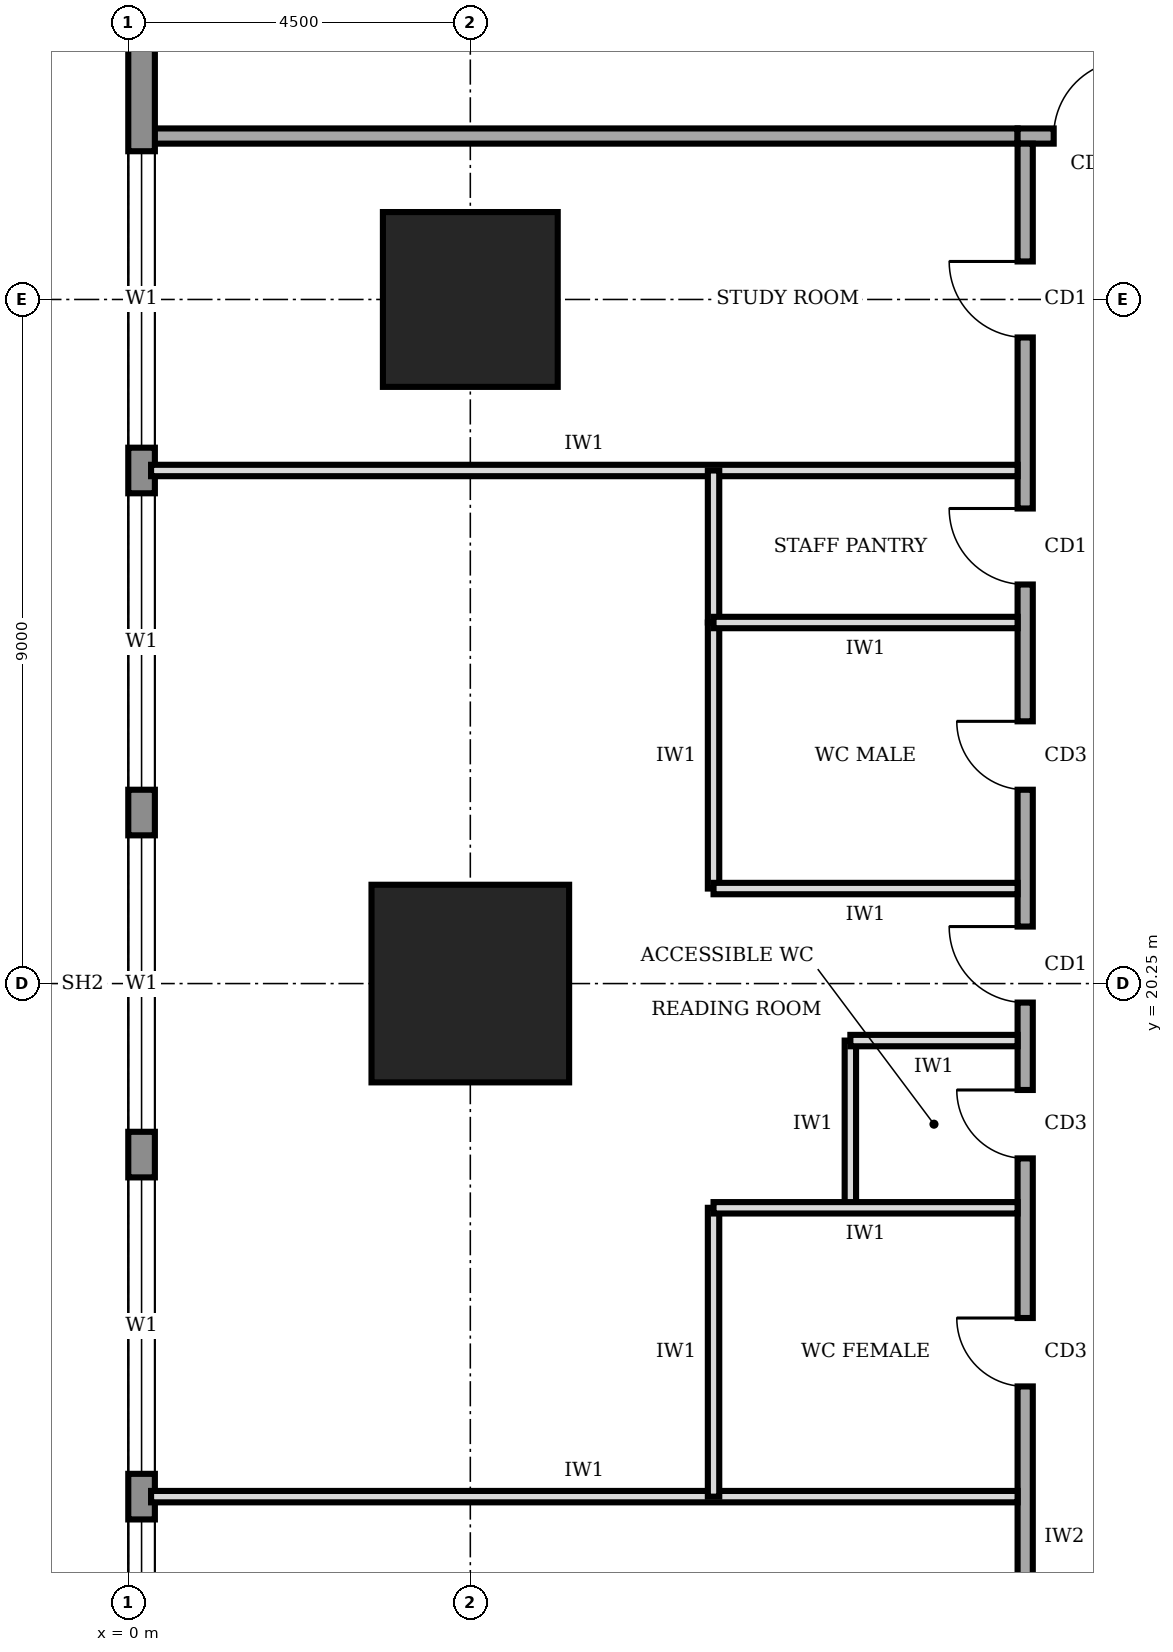
"""IFC4 building model, lengths in metres.
Left out: names, types, materials, properties, quantities, classifications, styles, units other than length and angle.
Written with IfcOpenShell. Run it as: python <this file> out.ifc"""

import sys

from ifc_helpers import new_model, si_unit, direction, frame, frame_2d, origin, origin_2d, place, context, subcontext, project, spatial, rectangle, extrude, element, fill, save


model = new_model("IFC4")
c1 = context("Model", 3, precision=1e-05, world=origin(), true_north=direction((0.0, 1.0)))
c2 = subcontext(c1, "Body", "Model", "MODEL_VIEW")
j1 = project(units=[si_unit("LENGTHUNIT", "METRE"), si_unit("PLANEANGLEUNIT", "RADIAN")], contexts=[c1])
p1 = place(None, origin())
s1 = spatial("IfcSite", under=j1, at=p1, CompositionType="ELEMENT")
p2 = place(p1, origin())
s2 = spatial("IfcBuilding", under=s1, at=p2, CompositionType="ELEMENT")
p3 = place(p2, frame((0.0, 0.0, 133.0)))
s3 = spatial("IfcBuildingStorey", under=s2, at=p3, CompositionType="ELEMENT", Elevation=133.0)
p4 = place(p3, frame((4.5, 20.25, 0.0), z_axis=(0.0, 0.0, 1.0), x_axis=(1.0, 0.0, 0.0)))
e1 = element("IfcColumn", 1, at=p4, inside=s3, PredefinedType="COLUMN", context=c2, shape_type="SweptSolid", body=[
    extrude(rectangle(XDim=2.6, YDim=2.6, at=origin_2d()), origin(), (0.0, 0.0, 1.0), 4.0),
])
p5 = place(p3, frame((4.5, 29.25, 0.0), z_axis=(0.0, 0.0, 1.0), x_axis=(1.0, 0.0, 0.0)))
e2 = element("IfcColumn", 2, at=p5, inside=s3, PredefinedType="COLUMN", context=c2, shape_type="SweptSolid", body=[
    extrude(rectangle(XDim=2.3, YDim=2.3, at=origin_2d()), origin(), (0.0, 0.0, 1.0), 4.0),
])
p6 = place(p3, frame((0.175, 35.98, 0.0), z_axis=(0.0, 0.0, 1.0), x_axis=(0.0, -1.0, 0.0)))
e3 = element("IfcWall", 3, at=p6, inside=s3, PredefinedType="STANDARD", context=c2, shape_type="SweptSolid", body=[
    extrude(rectangle(XDim=31.46, YDim=0.35, at=frame_2d((15.73, 0.0))), origin(), (0.0, 0.0, 1.0), 3.75),
])
p7 = place(p6, frame((27.21, 0.0, 0.9)))
e4 = element("IfcOpeningElement", 4, at=p7, cuts=e3, PredefinedType="OPENING", context=c2, shape_type="SweptSolid", body=[
    extrude(rectangle(XDim=3.9, YDim=2.2, at=frame_2d((1.95, 1.1))), frame((0.0, 0.185, 0.0), z_axis=(0.0, -1.0, 0.0), x_axis=(1.0, 0.0, 0.0)), (0.0, 0.0, 1.0), 0.37),
])
p8 = place(p6, frame((22.78, 0.0, 0.9)))
e5 = element("IfcOpeningElement", 5, at=p8, cuts=e3, PredefinedType="OPENING", context=c2, shape_type="SweptSolid", body=[
    extrude(rectangle(XDim=3.9, YDim=2.2, at=frame_2d((1.95, 1.1))), frame((0.0, 0.185, 0.0), z_axis=(0.0, -1.0, 0.0), x_axis=(1.0, 0.0, 0.0)), (0.0, 0.0, 1.0), 0.37),
])
p9 = place(p6, frame((18.28, 0.0, 0.9)))
e6 = element("IfcOpeningElement", 6, at=p9, cuts=e3, PredefinedType="OPENING", context=c2, shape_type="SweptSolid", body=[
    extrude(rectangle(XDim=3.9, YDim=2.2, at=frame_2d((1.95, 1.1))), frame((0.0, 0.185, 0.0), z_axis=(0.0, -1.0, 0.0), x_axis=(1.0, 0.0, 0.0)), (0.0, 0.0, 1.0), 0.37),
])
p10 = place(p6, frame((13.78, 0.0, 0.9)))
e7 = element("IfcOpeningElement", 7, at=p10, cuts=e3, PredefinedType="OPENING", context=c2, shape_type="SweptSolid", body=[
    extrude(rectangle(XDim=3.9, YDim=2.2, at=frame_2d((1.95, 1.1))), frame((0.0, 0.185, 0.0), z_axis=(0.0, -1.0, 0.0), x_axis=(1.0, 0.0, 0.0)), (0.0, 0.0, 1.0), 0.37),
])
p11 = place(p6, frame((9.28, 0.0, 0.9)))
e8 = element("IfcOpeningElement", 8, at=p11, cuts=e3, PredefinedType="OPENING", context=c2, shape_type="SweptSolid", body=[
    extrude(rectangle(XDim=3.9, YDim=2.2, at=frame_2d((1.95, 1.1))), frame((0.0, 0.185, 0.0), z_axis=(0.0, -1.0, 0.0), x_axis=(1.0, 0.0, 0.0)), (0.0, 0.0, 1.0), 0.37),
])
p12 = place(p6, frame((4.78, 0.0, 0.9)))
e9 = element("IfcOpeningElement", 9, at=p12, cuts=e3, PredefinedType="OPENING", context=c2, shape_type="SweptSolid", body=[
    extrude(rectangle(XDim=3.9, YDim=2.2, at=frame_2d((1.95, 1.1))), frame((0.0, 0.185, 0.0), z_axis=(0.0, -1.0, 0.0), x_axis=(1.0, 0.0, 0.0)), (0.0, 0.0, 1.0), 0.37),
])
p13 = place(p3, frame((28.6, 31.4, 0.0), z_axis=(0.0, 0.0, 1.0), x_axis=(-1.0, 0.0, 0.0)))
e10 = element("IfcWall", 10, at=p13, inside=s3, PredefinedType="SOLIDWALL", context=c2, shape_type="SweptSolid", body=[
    extrude(rectangle(XDim=16.9, YDim=0.2, at=frame_2d((8.45, 0.0))), origin(), (0.0, 0.0, 1.0), 3.75),
])
p14 = place(p13, frame((15.425, 0.0, 0.0)))
e11 = element("IfcOpeningElement", 11, at=p14, cuts=e10, PredefinedType="OPENING", context=c2, shape_type="SweptSolid", body=[
    extrude(rectangle(XDim=1.0, YDim=2.1, at=frame_2d((0.5, 1.05))), frame((0.0, 0.11, 0.0), z_axis=(0.0, -1.0, 0.0), x_axis=(1.0, 0.0, 0.0)), (0.0, 0.0, 1.0), 0.22),
])
p15 = place(p13, frame((12.35, 0.0, 0.0)))
e12 = element("IfcOpeningElement", 12, at=p15, cuts=e10, PredefinedType="OPENING", context=c2, shape_type="SweptSolid", body=[
    extrude(rectangle(XDim=1.0, YDim=2.1, at=frame_2d((0.5, 1.05))), frame((0.0, 0.11, 0.0), z_axis=(0.0, -1.0, 0.0), x_axis=(1.0, 0.0, 0.0)), (0.0, 0.0, 1.0), 0.22),
])
p16 = place(p13, frame((5.6, 0.0, 0.0)))
e13 = element("IfcOpeningElement", 13, at=p16, cuts=e10, PredefinedType="OPENING", context=c2, shape_type="SweptSolid", body=[
    extrude(rectangle(XDim=1.0, YDim=2.1, at=frame_2d((0.5, 1.05))), frame((0.0, 0.11, 0.0), z_axis=(0.0, -1.0, 0.0), x_axis=(1.0, 0.0, 0.0)), (0.0, 0.0, 1.0), 0.22),
])
p17 = place(p13, frame((0.275, 0.0, 0.0)))
e14 = element("IfcOpeningElement", 14, at=p17, cuts=e10, PredefinedType="OPENING", context=c2, shape_type="SweptSolid", body=[
    extrude(rectangle(XDim=1.0, YDim=2.1, at=frame_2d((0.5, 1.05))), frame((0.0, 0.11, 0.0), z_axis=(0.0, -1.0, 0.0), x_axis=(1.0, 0.0, 0.0)), (0.0, 0.0, 1.0), 0.22),
])
p18 = place(p3, frame((11.8, 31.3, 0.0), z_axis=(0.0, 0.0, 1.0), x_axis=(0.0, -1.0, 0.0)))
e15 = element("IfcWall", 15, at=p18, inside=s3, PredefinedType="SOLIDWALL", context=c2, shape_type="SweptSolid", body=[
    extrude(rectangle(XDim=23.8, YDim=0.2, at=frame_2d((11.9, 0.0))), origin(), (0.0, 0.0, 1.0), 3.75),
])
p19 = place(p18, frame((20.3, 0.0, 0.0)))
e16 = element("IfcOpeningElement", 16, at=p19, cuts=e15, PredefinedType="OPENING", context=c2, shape_type="SweptSolid", body=[
    extrude(rectangle(XDim=1.0, YDim=2.1, at=frame_2d((0.5, 1.05))), frame((0.0, 0.11, 0.0), z_axis=(0.0, -1.0, 0.0), x_axis=(1.0, 0.0, 0.0)), (0.0, 0.0, 1.0), 0.22),
])
p20 = place(p18, frame((15.45, 0.0, 0.0)))
e17 = element("IfcOpeningElement", 17, at=p20, cuts=e15, PredefinedType="OPENING", context=c2, shape_type="SweptSolid", body=[
    extrude(rectangle(XDim=0.9, YDim=2.1, at=frame_2d((0.45, 1.05))), frame((0.0, 0.11, 0.0), z_axis=(0.0, -1.0, 0.0), x_axis=(1.0, 0.0, 0.0)), (0.0, 0.0, 1.0), 0.22),
])
p21 = place(p18, frame((12.45, 0.0, 0.0)))
e18 = element("IfcOpeningElement", 18, at=p21, cuts=e15, PredefinedType="OPENING", context=c2, shape_type="SweptSolid", body=[
    extrude(rectangle(XDim=0.9, YDim=2.1, at=frame_2d((0.45, 1.05))), frame((0.0, 0.11, 0.0), z_axis=(0.0, -1.0, 0.0), x_axis=(1.0, 0.0, 0.0)), (0.0, 0.0, 1.0), 0.22),
])
p22 = place(p18, frame((7.6, 0.0, 0.0)))
e19 = element("IfcOpeningElement", 19, at=p22, cuts=e15, PredefinedType="OPENING", context=c2, shape_type="SweptSolid", body=[
    extrude(rectangle(XDim=0.9, YDim=2.1, at=frame_2d((0.45, 1.05))), frame((0.0, 0.11, 0.0), z_axis=(0.0, -1.0, 0.0), x_axis=(1.0, 0.0, 0.0)), (0.0, 0.0, 1.0), 0.22),
])
p23 = place(p18, frame((4.8, 0.0, 0.0)))
e20 = element("IfcOpeningElement", 20, at=p23, cuts=e15, PredefinedType="OPENING", context=c2, shape_type="SweptSolid", body=[
    extrude(rectangle(XDim=1.0, YDim=2.1, at=frame_2d((0.5, 1.05))), frame((0.0, 0.11, 0.0), z_axis=(0.0, -1.0, 0.0), x_axis=(1.0, 0.0, 0.0)), (0.0, 0.0, 1.0), 0.22),
])
p24 = place(p18, frame((10.3, 0.0, 0.0)))
e21 = element("IfcOpeningElement", 21, at=p24, cuts=e15, PredefinedType="OPENING", context=c2, shape_type="SweptSolid", body=[
    extrude(rectangle(XDim=1.0, YDim=2.1, at=frame_2d((0.5, 1.05))), frame((0.0, 0.11, 0.0), z_axis=(0.0, -1.0, 0.0), x_axis=(1.0, 0.0, 0.0)), (0.0, 0.0, 1.0), 0.22),
])
p25 = place(p18, frame((1.55, 0.0, 0.0)))
e22 = element("IfcOpeningElement", 22, at=p25, cuts=e15, PredefinedType="OPENING", context=c2, shape_type="SweptSolid", body=[
    extrude(rectangle(XDim=1.0, YDim=2.1, at=frame_2d((0.5, 1.05))), frame((0.0, 0.11, 0.0), z_axis=(0.0, -1.0, 0.0), x_axis=(1.0, 0.0, 0.0)), (0.0, 0.0, 1.0), 0.22),
])
p26 = place(p3, frame((0.3, 31.4, 0.0), z_axis=(0.0, 0.0, 1.0), x_axis=(1.0, 0.0, 0.0)))
e23 = element("IfcWall", 23, at=p26, inside=s3, PredefinedType="SOLIDWALL", context=c2, shape_type="SweptSolid", body=[
    extrude(rectangle(XDim=11.4, YDim=0.2, at=frame_2d((5.7, 0.0))), origin(), (0.0, 0.0, 1.0), 3.75),
])
for number, where, z_axis, x_axis in (
    (24, (0.3, 13.5, 0.0), (0.0, 0.0, 1.0), (1.0, 0.0, 0.0)),
    (25, (0.3, 27.0, 0.0), (0.0, 0.0, 1.0), (1.0, 0.0, 0.0)),
):
    element("IfcWall", number, at=place(p3, frame(where, z_axis=z_axis, x_axis=x_axis)), inside=s3, PredefinedType="PARTITIONING", context=c2, shape_type="SweptSolid", body=[
        extrude(rectangle(XDim=11.4, YDim=0.15, at=frame_2d((5.7, 0.0))), origin(), (0.0, 0.0, 1.0), 3.75),
    ])
p27 = place(p3, frame((11.7, 17.3, 0.0), z_axis=(0.0, 0.0, 1.0), x_axis=(-1.0, 0.0, 0.0)))
e26 = element("IfcWall", 26, at=p27, inside=s3, PredefinedType="PARTITIONING", context=c2, shape_type="SweptSolid", body=[
    extrude(rectangle(XDim=4.0, YDim=0.15, at=frame_2d((2.0, 0.0))), origin(), (0.0, 0.0, 1.0), 3.75),
])
p28 = place(p3, frame((11.7, 19.5, 0.0), z_axis=(0.0, 0.0, 1.0), x_axis=(-1.0, 0.0, 0.0)))
e27 = element("IfcWall", 27, at=p28, inside=s3, PredefinedType="PARTITIONING", context=c2, shape_type="SweptSolid", body=[
    extrude(rectangle(XDim=2.2, YDim=0.15, at=frame_2d((1.1, 0.0))), origin(), (0.0, 0.0, 1.0), 2.85),
])
for number, where, z_axis, x_axis in (
    (28, (11.7, 21.5, 0.0), (0.0, 0.0, 1.0), (-1.0, 0.0, 0.0)),
    (29, (11.7, 25.0, 0.0), (0.0, 0.0, 1.0), (-1.0, 0.0, 0.0)),
):
    element("IfcWall", number, at=place(p3, frame(where, z_axis=z_axis, x_axis=x_axis)), inside=s3, PredefinedType="PARTITIONING", context=c2, shape_type="SweptSolid", body=[
        extrude(rectangle(XDim=4.0, YDim=0.15, at=frame_2d((2.0, 0.0))), origin(), (0.0, 0.0, 1.0), 3.75),
    ])
p29 = place(p3, frame((7.7, 13.5, 0.0), z_axis=(0.0, 0.0, 1.0), x_axis=(0.0, 1.0, 0.0)))
e30 = element("IfcWall", 30, at=p29, inside=s3, PredefinedType="PARTITIONING", context=c2, shape_type="SweptSolid", body=[
    extrude(rectangle(XDim=3.8, YDim=0.15, at=frame_2d((1.9, 0.0))), origin(), (0.0, 0.0, 1.0), 3.75),
])
p30 = place(p3, frame((9.5, 17.3, 0.0), z_axis=(0.0, 0.0, 1.0), x_axis=(0.0, 1.0, 0.0)))
e31 = element("IfcWall", 31, at=p30, inside=s3, PredefinedType="PARTITIONING", context=c2, shape_type="SweptSolid", body=[
    extrude(rectangle(XDim=2.2, YDim=0.15, at=frame_2d((1.1, 0.0))), origin(), (0.0, 0.0, 1.0), 3.75),
])
p31 = place(p3, frame((7.7, 21.5, 0.0), z_axis=(0.0, 0.0, 1.0), x_axis=(0.0, 1.0, 0.0)))
e32 = element("IfcWall", 32, at=p31, inside=s3, PredefinedType="PARTITIONING", context=c2, shape_type="SweptSolid", body=[
    extrude(rectangle(XDim=3.5, YDim=0.15, at=frame_2d((1.75, 0.0))), origin(), (0.0, 0.0, 1.0), 3.75),
])
p32 = place(p3, frame((7.7, 25.0, 0.0), z_axis=(0.0, 0.0, 1.0), x_axis=(0.0, 1.0, 0.0)))
e33 = element("IfcWall", 33, at=p32, inside=s3, PredefinedType="PARTITIONING", context=c2, shape_type="SweptSolid", body=[
    extrude(rectangle(XDim=2.0, YDim=0.15, at=frame_2d((1.0, 0.0))), origin(), (0.0, 0.0, 1.0), 3.75),
])
p33 = place(p8, origin())
e34 = element("IfcWindow", 34, at=p33, inside=s3, PartitioningType="SINGLE_PANEL", PredefinedType="WINDOW", context=c2, shape_type="SweptSolid", body=[
    extrude(rectangle(XDim=3.9, YDim=2.2, at=frame_2d((1.95, 1.1))), frame((0.0, 0.03, 0.0), z_axis=(0.0, -1.0, 0.0), x_axis=(1.0, 0.0, 0.0)), (0.0, 0.0, 1.0), 0.06),
])
fill(e5, e34)
p34 = place(p9, origin())
e35 = element("IfcWindow", 35, at=p34, inside=s3, PartitioningType="SINGLE_PANEL", PredefinedType="WINDOW", context=c2, shape_type="SweptSolid", body=[
    extrude(rectangle(XDim=3.9, YDim=2.2, at=frame_2d((1.95, 1.1))), frame((0.0, 0.03, 0.0), z_axis=(0.0, -1.0, 0.0), x_axis=(1.0, 0.0, 0.0)), (0.0, 0.0, 1.0), 0.06),
])
fill(e6, e35)
p35 = place(p10, origin())
e36 = element("IfcWindow", 36, at=p35, inside=s3, PartitioningType="SINGLE_PANEL", PredefinedType="WINDOW", context=c2, shape_type="SweptSolid", body=[
    extrude(rectangle(XDim=3.9, YDim=2.2, at=frame_2d((1.95, 1.1))), frame((0.0, 0.03, 0.0), z_axis=(0.0, -1.0, 0.0), x_axis=(1.0, 0.0, 0.0)), (0.0, 0.0, 1.0), 0.06),
])
fill(e7, e36)
p36 = place(p11, origin())
e37 = element("IfcWindow", 37, at=p36, inside=s3, PartitioningType="SINGLE_PANEL", PredefinedType="WINDOW", context=c2, shape_type="SweptSolid", body=[
    extrude(rectangle(XDim=3.9, YDim=2.2, at=frame_2d((1.95, 1.1))), frame((0.0, 0.03, 0.0), z_axis=(0.0, -1.0, 0.0), x_axis=(1.0, 0.0, 0.0)), (0.0, 0.0, 1.0), 0.06),
])
fill(e8, e37)
p37 = place(p12, origin())
e38 = element("IfcWindow", 38, at=p37, inside=s3, PartitioningType="SINGLE_PANEL", PredefinedType="WINDOW", context=c2, shape_type="SweptSolid", body=[
    extrude(rectangle(XDim=3.9, YDim=2.2, at=frame_2d((1.95, 1.1))), frame((0.0, 0.03, 0.0), z_axis=(0.0, -1.0, 0.0), x_axis=(1.0, 0.0, 0.0)), (0.0, 0.0, 1.0), 0.06),
])
fill(e9, e38)
p38 = place(p14, frame((1.0, 0.0, 0.0), z_axis=(0.0, 0.0, 1.0), x_axis=(-1.0, 0.0, 0.0)))
e39 = element("IfcDoor", 39, at=p38, inside=s3, OperationType="SINGLE_SWING_RIGHT", PredefinedType="DOOR", context=c2, shape_type="SweptSolid", body=[
    extrude(rectangle(XDim=1.0, YDim=2.1, at=frame_2d((0.5, 1.05))), frame((0.0, 0.025, 0.0), z_axis=(0.0, -1.0, 0.0), x_axis=(1.0, 0.0, 0.0)), (0.0, 0.0, 1.0), 0.05),
])
fill(e11, e39)
p39 = place(p20, frame((0.9, 0.0, 0.0), z_axis=(0.0, 0.0, 1.0), x_axis=(-1.0, 0.0, 0.0)))
e40 = element("IfcDoor", 40, at=p39, inside=s3, OperationType="SINGLE_SWING_RIGHT", PredefinedType="DOOR", context=c2, shape_type="SweptSolid", body=[
    extrude(rectangle(XDim=0.9, YDim=2.1, at=frame_2d((0.45, 1.05))), frame((0.0, 0.025, 0.0), z_axis=(0.0, -1.0, 0.0), x_axis=(1.0, 0.0, 0.0)), (0.0, 0.0, 1.0), 0.05),
])
fill(e17, e40)
p40 = place(p21, frame((0.9, 0.0, 0.0), z_axis=(0.0, 0.0, 1.0), x_axis=(-1.0, 0.0, 0.0)))
e41 = element("IfcDoor", 41, at=p40, inside=s3, OperationType="SINGLE_SWING_RIGHT", PredefinedType="DOOR", context=c2, shape_type="SweptSolid", body=[
    extrude(rectangle(XDim=0.9, YDim=2.1, at=frame_2d((0.45, 1.05))), frame((0.0, 0.025, 0.0), z_axis=(0.0, -1.0, 0.0), x_axis=(1.0, 0.0, 0.0)), (0.0, 0.0, 1.0), 0.05),
])
fill(e18, e41)
p41 = place(p22, frame((0.9, 0.0, 0.0), z_axis=(0.0, 0.0, 1.0), x_axis=(-1.0, 0.0, 0.0)))
e42 = element("IfcDoor", 42, at=p41, inside=s3, OperationType="SINGLE_SWING_RIGHT", PredefinedType="DOOR", context=c2, shape_type="SweptSolid", body=[
    extrude(rectangle(XDim=0.9, YDim=2.1, at=frame_2d((0.45, 1.05))), frame((0.0, 0.025, 0.0), z_axis=(0.0, -1.0, 0.0), x_axis=(1.0, 0.0, 0.0)), (0.0, 0.0, 1.0), 0.05),
])
fill(e19, e42)
p42 = place(p23, frame((1.0, 0.0, 0.0), z_axis=(0.0, 0.0, 1.0), x_axis=(-1.0, 0.0, 0.0)))
e43 = element("IfcDoor", 43, at=p42, inside=s3, OperationType="SINGLE_SWING_RIGHT", PredefinedType="DOOR", context=c2, shape_type="SweptSolid", body=[
    extrude(rectangle(XDim=1.0, YDim=2.1, at=frame_2d((0.5, 1.05))), frame((0.0, 0.025, 0.0), z_axis=(0.0, -1.0, 0.0), x_axis=(1.0, 0.0, 0.0)), (0.0, 0.0, 1.0), 0.05),
])
fill(e20, e43)
p43 = place(p24, frame((1.0, 0.0, 0.0), z_axis=(0.0, 0.0, 1.0), x_axis=(-1.0, 0.0, 0.0)))
e44 = element("IfcDoor", 44, at=p43, inside=s3, OperationType="SINGLE_SWING_RIGHT", PredefinedType="DOOR", context=c2, shape_type="SweptSolid", body=[
    extrude(rectangle(XDim=1.0, YDim=2.1, at=frame_2d((0.5, 1.05))), frame((0.0, 0.025, 0.0), z_axis=(0.0, -1.0, 0.0), x_axis=(1.0, 0.0, 0.0)), (0.0, 0.0, 1.0), 0.05),
])
fill(e21, e44)
p44 = place(p25, frame((1.0, 0.0, 0.0), z_axis=(0.0, 0.0, 1.0), x_axis=(-1.0, 0.0, 0.0)))
e45 = element("IfcDoor", 45, at=p44, inside=s3, OperationType="SINGLE_SWING_RIGHT", PredefinedType="DOOR", context=c2, shape_type="SweptSolid", body=[
    extrude(rectangle(XDim=1.0, YDim=2.1, at=frame_2d((0.5, 1.05))), frame((0.0, 0.025, 0.0), z_axis=(0.0, -1.0, 0.0), x_axis=(1.0, 0.0, 0.0)), (0.0, 0.0, 1.0), 0.05),
])
fill(e22, e45)
save(model, sys.argv[1])
